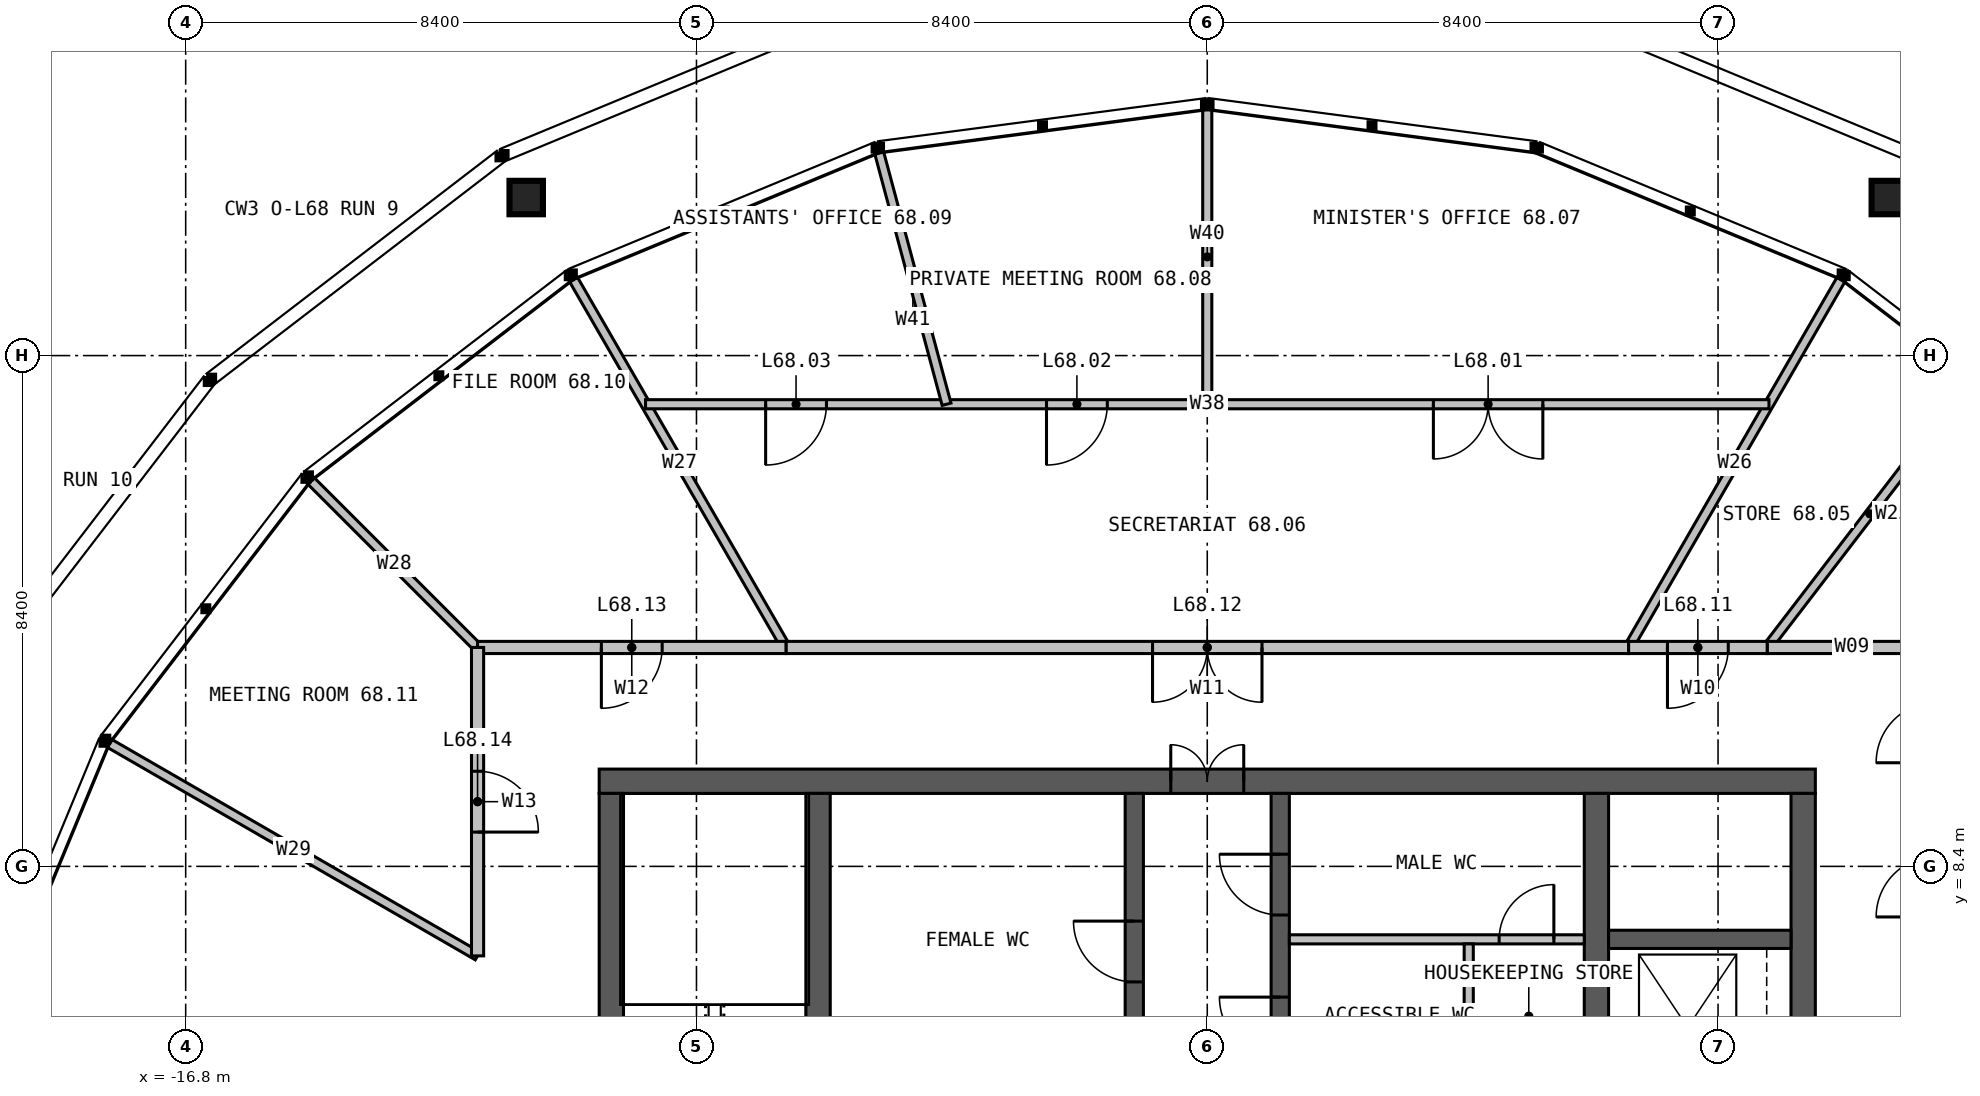
"""IFC4 building model, lengths in metres.
Left out: names, types, materials, properties, quantities, classifications, styles, units other than length and angle.
Written with IfcOpenShell. Run it as: python <this file> out.ifc"""

import sys

from ifc_helpers import new_model, si_unit, direction, frame, frame_2d, origin, origin_2d, place, context, subcontext, project, spatial, rectangle, hollow_rectangle, extrude, element, fill, save


model = new_model("IFC4")
c1 = context("Model", 3, precision=1e-05, world=origin(), true_north=direction((0.0, 1.0)))
c2 = subcontext(c1, "Body", "Model", "MODEL_VIEW")
j1 = project(units=[si_unit("LENGTHUNIT", "METRE"), si_unit("PLANEANGLEUNIT", "RADIAN")], contexts=[c1])
p1 = place(None, origin())
s1 = spatial("IfcSite", under=j1, at=p1, CompositionType="ELEMENT")
p2 = place(p1, origin())
s2 = spatial("IfcBuilding", under=s1, at=p2, CompositionType="ELEMENT")
p3 = place(p2, frame((0.0, 0.0, 280.0)))
s3 = spatial("IfcBuildingStorey", under=s2, at=p3, CompositionType="ELEMENT", Elevation=280.0)
p4 = place(p3, frame((-10.0, 9.8, 0.0), z_axis=(0.0, 0.0, 1.0), x_axis=(1.0, 0.0, 0.0)))
e1 = element("IfcWall", 1, at=p4, inside=s3, PredefinedType="SOLIDWALL", context=c2, shape_type="SweptSolid", body=[
    extrude(rectangle(XDim=20.0, YDim=0.4, at=frame_2d((10.0, 0.0))), origin(), (0.0, 0.0, 1.0), 4.0),
])
p5 = place(p4, frame((9.4, 0.0, 0.0)))
e2 = element("IfcOpeningElement", 2, at=p5, cuts=e1, PredefinedType="OPENING", context=c2, shape_type="SweptSolid", body=[
    extrude(rectangle(XDim=1.2, YDim=2.2, at=frame_2d((0.6, 1.1))), frame((0.0, 0.21, 0.0), z_axis=(0.0, -1.0, 0.0), x_axis=(1.0, 0.0, 0.0)), (0.0, 0.0, 1.0), 0.42),
])
for number, where, z_axis, x_axis in (
    (3, (9.8, -9.6, 0.0), (0.0, 0.0, 1.0), (0.0, 1.0, 0.0)),
    (4, (-9.8, 9.6, 0.0), (0.0, 0.0, 1.0), (0.0, -1.0, 0.0)),
):
    element("IfcWall", number, at=place(p3, frame(where, z_axis=z_axis, x_axis=x_axis)), inside=s3, PredefinedType="SOLIDWALL", context=c2, shape_type="SweptSolid", body=[
        extrude(rectangle(XDim=19.2, YDim=0.4, at=frame_2d((9.6, 0.0))), origin(), (0.0, 0.0, 1.0), 4.0),
    ])
p6 = place(p3, frame((-6.4, -9.6, 0.0), z_axis=(0.0, 0.0, 1.0), x_axis=(0.0, 1.0, 0.0)))
e5 = element("IfcWall", 5, at=p6, inside=s3, PredefinedType="SOLIDWALL", context=c2, shape_type="SweptSolid", body=[
    extrude(rectangle(XDim=19.2, YDim=0.4, at=frame_2d((9.6, 0.0))), origin(), (0.0, 0.0, 1.0), 4.0),
])
p7 = place(p6, frame((9.1, 0.0, 0.0)))
e6 = element("IfcOpeningElement", 6, at=p7, cuts=e5, PredefinedType="OPENING", context=c2, shape_type="SweptSolid", body=[
    extrude(rectangle(XDim=1.0, YDim=2.2, at=frame_2d((0.5, 1.1))), frame((0.0, 0.21, 0.0), z_axis=(0.0, -1.0, 0.0), x_axis=(1.0, 0.0, 0.0)), (0.0, 0.0, 1.0), 0.42),
])
p8 = place(p3, frame((6.4, 9.6, 0.0), z_axis=(0.0, 0.0, 1.0), x_axis=(0.0, -1.0, 0.0)))
e7 = element("IfcWall", 7, at=p8, inside=s3, PredefinedType="SOLIDWALL", context=c2, shape_type="SweptSolid", body=[
    extrude(rectangle(XDim=19.2, YDim=0.4, at=frame_2d((9.6, 0.0))), origin(), (0.0, 0.0, 1.0), 4.0),
])
p9 = place(p8, frame((9.1, 0.0, 0.0)))
e8 = element("IfcOpeningElement", 8, at=p9, cuts=e7, PredefinedType="OPENING", context=c2, shape_type="SweptSolid", body=[
    extrude(rectangle(XDim=1.0, YDim=2.2, at=frame_2d((0.5, 1.1))), frame((0.0, 0.21, 0.0), z_axis=(0.0, -1.0, 0.0), x_axis=(1.0, 0.0, 0.0)), (0.0, 0.0, 1.0), 0.42),
])
p10 = place(p3, frame((-1.2, 1.45, 0.0), z_axis=(0.0, 0.0, 1.0), x_axis=(0.0, 1.0, 0.0)))
e9 = element("IfcWall", 9, at=p10, inside=s3, PredefinedType="SOLIDWALL", context=c2, shape_type="SweptSolid", body=[
    extrude(rectangle(XDim=8.15, YDim=0.3, at=frame_2d((4.075, 0.0))), origin(), (0.0, 0.0, 1.0), 4.0),
])
p11 = place(p10, frame((5.05, 0.0, 0.0)))
e10 = element("IfcOpeningElement", 10, at=p11, cuts=e9, PredefinedType="OPENING", context=c2, shape_type="SweptSolid", body=[
    extrude(rectangle(XDim=1.0, YDim=2.2, at=frame_2d((0.5, 1.1))), frame((0.0, 0.16, 0.0), z_axis=(0.0, -1.0, 0.0), x_axis=(1.0, 0.0, 0.0)), (0.0, 0.0, 1.0), 0.32),
])
p12 = place(p3, frame((1.2, 1.45, 0.0), z_axis=(0.0, 0.0, 1.0), x_axis=(0.0, 1.0, 0.0)))
e11 = element("IfcWall", 11, at=p12, inside=s3, PredefinedType="SOLIDWALL", context=c2, shape_type="SweptSolid", body=[
    extrude(rectangle(XDim=8.15, YDim=0.3, at=frame_2d((4.075, 0.0))), origin(), (0.0, 0.0, 1.0), 4.0),
])
p13 = place(p12, frame((3.8, 0.0, 0.0)))
e12 = element("IfcOpeningElement", 12, at=p13, cuts=e11, PredefinedType="OPENING", context=c2, shape_type="SweptSolid", body=[
    extrude(rectangle(XDim=1.0, YDim=2.2, at=frame_2d((0.5, 1.1))), frame((0.0, 0.16, 0.0), z_axis=(0.0, -1.0, 0.0), x_axis=(1.0, 0.0, 0.0)), (0.0, 0.0, 1.0), 0.32),
])
p14 = place(p12, frame((6.15, 0.0, 0.0)))
e13 = element("IfcOpeningElement", 13, at=p14, cuts=e11, PredefinedType="OPENING", context=c2, shape_type="SweptSolid", body=[
    extrude(rectangle(XDim=1.0, YDim=2.2, at=frame_2d((0.5, 1.1))), frame((0.0, 0.16, 0.0), z_axis=(0.0, -1.0, 0.0), x_axis=(1.0, 0.0, 0.0)), (0.0, 0.0, 1.0), 0.32),
])
p15 = place(p3, frame((6.6, 7.2, 0.0), z_axis=(0.0, 0.0, 1.0), x_axis=(1.0, 0.0, 0.0)))
e14 = element("IfcWall", 14, at=p15, inside=s3, PredefinedType="SOLIDWALL", context=c2, shape_type="SweptSolid", body=[
    extrude(rectangle(XDim=3.0, YDim=0.3, at=frame_2d((1.5, 0.0))), origin(), (0.0, 0.0, 1.0), 4.0),
])
for number, where, z_axis, x_axis in (
    (15, (11.2, 19.399, -0.71), (0.0, 0.0, 1.0), (1.0, 0.0, 0.0)),
    (16, (-11.2, 19.399, -0.71), (0.0, 0.0, 1.0), (1.0, 0.0, 0.0)),
):
    element("IfcColumn", number, at=place(p3, frame(where, z_axis=z_axis, x_axis=x_axis)), inside=s3, PredefinedType="COLUMN", context=c2, shape_type="SweptSolid", body=[
        extrude(hollow_rectangle(XDim=0.55, YDim=0.55, WallThickness=0.04, at=origin_2d()), origin(), (0.0, 0.0, 1.0), 4.0),
    ])
p16 = place(p3, frame((1.35, 7.2, 0.0), z_axis=(0.0, 0.0, 1.0), x_axis=(1.0, 0.0, 0.0)))
e17 = element("IfcWall", 17, at=p16, inside=s3, PredefinedType="PARTITIONING", context=c2, shape_type="SweptSolid", body=[
    extrude(rectangle(XDim=4.85, YDim=0.15, at=frame_2d((2.425, 0.0))), origin(), (0.0, 0.0, 1.0), 3.75),
])
p17 = place(p16, frame((3.45, 0.0, 0.0)))
e18 = element("IfcOpeningElement", 18, at=p17, cuts=e17, PredefinedType="OPENING", context=c2, shape_type="SweptSolid", body=[
    extrude(rectangle(XDim=0.9, YDim=2.2, at=frame_2d((0.45, 1.1))), frame((0.0, 0.085, 0.0), z_axis=(0.0, -1.0, 0.0), x_axis=(1.0, 0.0, 0.0)), (0.0, 0.0, 1.0), 0.17),
])
p18 = place(p3, frame((4.3, 4.75, 0.0), z_axis=(0.0, 0.0, 1.0), x_axis=(0.0, 1.0, 0.0)))
e19 = element("IfcWall", 19, at=p18, inside=s3, PredefinedType="PARTITIONING", context=c2, shape_type="SweptSolid", body=[
    extrude(rectangle(XDim=2.375, YDim=0.15, at=frame_2d((1.188, 0.0))), origin(), (0.0, 0.0, 1.0), 3.75),
])
p19 = place(p3, frame((9.208, 12.0, 0.0), z_axis=(0.0, 0.0, 1.0), x_axis=(0.608745928377, 0.793365234103, 0.0)))
e20 = element("IfcWall", 20, at=p19, inside=s3, PredefinedType="PARTITIONING", context=c2, shape_type="SweptSolid", body=[
    extrude(rectangle(XDim=5.542, YDim=0.15, at=frame_2d((2.771, 0.0))), origin(), (0.0, 0.0, 1.0), 2.79),
])
for number, where, z_axis, x_axis in (
    (21, (6.928, 12.0, 0.0), (0.0, 0.0, 1.0), (0.5, 0.866, 0.0)),
    (22, (-6.928, 12.0, 0.0), (0.0, 0.0, 1.0), (-0.5, 0.866, 0.0)),
):
    element("IfcWall", number, at=place(p3, frame(where, z_axis=z_axis, x_axis=x_axis)), inside=s3, PredefinedType="PARTITIONING", context=c2, shape_type="SweptSolid", body=[
        extrude(rectangle(XDim=6.99, YDim=0.15, at=frame_2d((3.495, 0.0))), origin(), (0.0, 0.0, 1.0), 2.79),
    ])
p20 = place(p3, frame((-12.0, 12.0, 0.0), z_axis=(0.0, 0.0, 1.0), x_axis=(-0.707106781187, 0.707106781187, 0.0)))
e23 = element("IfcWall", 23, at=p20, inside=s3, PredefinedType="PARTITIONING", context=c2, shape_type="SweptSolid", body=[
    extrude(rectangle(XDim=3.876, YDim=0.15, at=frame_2d((1.938, 0.0))), origin(), (0.0, 0.0, 1.0), 2.7),
])
p21 = place(p3, frame((-12.0, 6.928, 0.0), z_axis=(0.0, 0.0, 1.0), x_axis=(-0.866031452229, 0.49998952364, 0.0)))
e24 = element("IfcWall", 24, at=p21, inside=s3, PredefinedType="PARTITIONING", context=c2, shape_type="SweptSolid", body=[
    extrude(rectangle(XDim=6.99, YDim=0.15, at=frame_2d((3.495, 0.0))), origin(), (0.0, 0.0, 1.0), 2.7),
])
p22 = place(p3, frame((12.0, 12.0, 0.0), z_axis=(0.0, 0.0, 1.0), x_axis=(-1.0, 0.0, 0.0)))
e25 = element("IfcWall", 25, at=p22, inside=s3, PredefinedType="PARTITIONING", context=c2, shape_type="SweptSolid", body=[
    extrude(rectangle(XDim=2.792, YDim=0.2, at=frame_2d((1.396, 0.0))), origin(), (0.0, 0.0, 1.0), 3.7),
])
p23 = place(p3, frame((9.208, 12.0, 0.0), z_axis=(0.0, 0.0, 1.0), x_axis=(-1.0, 0.0, 0.0)))
e26 = element("IfcWall", 26, at=p23, inside=s3, PredefinedType="PARTITIONING", context=c2, shape_type="SweptSolid", body=[
    extrude(rectangle(XDim=2.28, YDim=0.2, at=frame_2d((1.14, 0.0))), origin(), (0.0, 0.0, 1.0), 3.7),
])
p24 = place(p23, frame((0.64, 0.0, 0.0)))
e27 = element("IfcOpeningElement", 27, at=p24, cuts=e26, PredefinedType="OPENING", context=c2, shape_type="SweptSolid", body=[
    extrude(rectangle(XDim=1.0, YDim=2.2, at=frame_2d((0.5, 1.1))), frame((0.0, 0.11, 0.0), z_axis=(0.0, -1.0, 0.0), x_axis=(1.0, 0.0, 0.0)), (0.0, 0.0, 1.0), 0.22),
])
p25 = place(p3, frame((9.238, 16.0, 0.0), z_axis=(0.0, 0.0, 1.0), x_axis=(-1.0, 0.0, 0.0)))
e28 = element("IfcWall", 28, at=p25, inside=s3, PredefinedType="PARTITIONING", context=c2, shape_type="SweptSolid", body=[
    extrude(rectangle(XDim=18.475, YDim=0.15, at=frame_2d((9.238, 0.0))), origin(), (0.0, 0.0, 1.0), 2.79),
])
p26 = place(p25, frame((3.719, 0.0, 0.0)))
e29 = element("IfcOpeningElement", 29, at=p26, cuts=e28, PredefinedType="OPENING", context=c2, shape_type="SweptSolid", body=[
    extrude(rectangle(XDim=1.8, YDim=2.2, at=frame_2d((0.9, 1.1))), frame((0.0, 0.085, 0.0), z_axis=(0.0, -1.0, 0.0), x_axis=(1.0, 0.0, 0.0)), (0.0, 0.0, 1.0), 0.17),
])
p27 = place(p25, frame((10.881, 0.0, 0.0)))
e30 = element("IfcOpeningElement", 30, at=p27, cuts=e28, PredefinedType="OPENING", context=c2, shape_type="SweptSolid", body=[
    extrude(rectangle(XDim=1.0, YDim=2.2, at=frame_2d((0.5, 1.1))), frame((0.0, 0.085, 0.0), z_axis=(0.0, -1.0, 0.0), x_axis=(1.0, 0.0, 0.0)), (0.0, 0.0, 1.0), 0.17),
])
p28 = place(p25, frame((15.5, 0.0, 0.0)))
e31 = element("IfcOpeningElement", 31, at=p28, cuts=e28, PredefinedType="OPENING", context=c2, shape_type="SweptSolid", body=[
    extrude(rectangle(XDim=1.0, YDim=2.2, at=frame_2d((0.5, 1.1))), frame((0.0, 0.085, 0.0), z_axis=(0.0, -1.0, 0.0), x_axis=(1.0, 0.0, 0.0)), (0.0, 0.0, 1.0), 0.17),
])
p29 = place(p3, frame((0.0, 16.0, 0.0), z_axis=(0.0, 0.0, 1.0), x_axis=(0.0, 1.0, 0.0)))
e32 = element("IfcWall", 32, at=p29, inside=s3, PredefinedType="PARTITIONING", context=c2, shape_type="SweptSolid", body=[
    extrude(rectangle(XDim=4.846, YDim=0.15, at=frame_2d((2.423, 0.0))), origin(), (0.0, 0.0, 1.0), 2.79),
])
p30 = place(p3, frame((-4.287, 16.0, 0.0), z_axis=(0.0, 0.0, 1.0), x_axis=(-0.258854832266, 0.965916236437, 0.0)))
e33 = element("IfcWall", 33, at=p30, inside=s3, PredefinedType="PARTITIONING", context=c2, shape_type="SweptSolid", body=[
    extrude(rectangle(XDim=4.282, YDim=0.15, at=frame_2d((2.141, 0.0))), origin(), (0.0, 0.0, 1.0), 2.7),
])
p31 = place(p3, frame((6.928, 12.0, 0.0), z_axis=(0.0, 0.0, 1.0), x_axis=(-1.0, 0.0, 0.0)))
e34 = element("IfcWall", 34, at=p31, inside=s3, PredefinedType="PARTITIONING", context=c2, shape_type="SweptSolid", body=[
    extrude(rectangle(XDim=13.856, YDim=0.2, at=frame_2d((6.928, 0.0))), origin(), (0.0, 0.0, 1.0), 3.7),
])
p32 = place(p31, frame((6.028, 0.0, 0.0)))
e35 = element("IfcOpeningElement", 35, at=p32, cuts=e34, PredefinedType="OPENING", context=c2, shape_type="SweptSolid", body=[
    extrude(rectangle(XDim=1.8, YDim=2.2, at=frame_2d((0.9, 1.1))), frame((0.0, 0.11, 0.0), z_axis=(0.0, -1.0, 0.0), x_axis=(1.0, 0.0, 0.0)), (0.0, 0.0, 1.0), 0.22),
])
p33 = place(p3, frame((-6.928, 12.0, 0.0), z_axis=(0.0, 0.0, 1.0), x_axis=(-1.0, 0.0, 0.0)))
e36 = element("IfcWall", 36, at=p33, inside=s3, PredefinedType="PARTITIONING", context=c2, shape_type="SweptSolid", body=[
    extrude(rectangle(XDim=5.072, YDim=0.2, at=frame_2d((2.536, 0.0))), origin(), (0.0, 0.0, 1.0), 3.7),
])
p34 = place(p33, frame((2.036, 0.0, 0.0)))
e37 = element("IfcOpeningElement", 37, at=p34, cuts=e36, PredefinedType="OPENING", context=c2, shape_type="SweptSolid", body=[
    extrude(rectangle(XDim=1.0, YDim=2.2, at=frame_2d((0.5, 1.1))), frame((0.0, 0.11, 0.0), z_axis=(0.0, -1.0, 0.0), x_axis=(1.0, 0.0, 0.0)), (0.0, 0.0, 1.0), 0.22),
])
p35 = place(p3, frame((-12.0, 12.0, 0.0), z_axis=(0.0, 0.0, 1.0), x_axis=(0.0, -1.0, 0.0)))
e38 = element("IfcWall", 38, at=p35, inside=s3, PredefinedType="PARTITIONING", context=c2, shape_type="SweptSolid", body=[
    extrude(rectangle(XDim=5.072, YDim=0.2, at=frame_2d((2.536, 0.0))), origin(), (0.0, 0.0, 1.0), 3.7),
])
p36 = place(p35, frame((2.036, 0.0, 0.0)))
e39 = element("IfcOpeningElement", 39, at=p36, cuts=e38, PredefinedType="OPENING", context=c2, shape_type="SweptSolid", body=[
    extrude(rectangle(XDim=1.0, YDim=2.2, at=frame_2d((0.5, 1.1))), frame((0.0, 0.11, 0.0), z_axis=(0.0, -1.0, 0.0), x_axis=(1.0, 0.0, 0.0)), (0.0, 0.0, 1.0), 0.22),
])
p37 = place(p5, origin())
e40 = element("IfcDoor", 40, at=p37, inside=s3, OperationType="DOUBLE_DOOR_SINGLE_SWING", PredefinedType="DOOR", context=c2, shape_type="SweptSolid", body=[
    extrude(rectangle(XDim=1.2, YDim=2.2, at=frame_2d((0.6, 1.1))), frame((0.0, 0.025, 0.0), z_axis=(0.0, -1.0, 0.0), x_axis=(1.0, 0.0, 0.0)), (0.0, 0.0, 1.0), 0.05),
])
fill(e2, e40)
p38 = place(p11, origin())
e41 = element("IfcDoor", 41, at=p38, inside=s3, OperationType="SINGLE_SWING_RIGHT", PredefinedType="DOOR", context=c2, shape_type="SweptSolid", body=[
    extrude(rectangle(XDim=1.0, YDim=2.2, at=frame_2d((0.5, 1.1))), frame((0.0, 0.025, 0.0), z_axis=(0.0, -1.0, 0.0), x_axis=(1.0, 0.0, 0.0)), (0.0, 0.0, 1.0), 0.05),
])
fill(e10, e41)
p39 = place(p13, origin())
e42 = element("IfcDoor", 42, at=p39, inside=s3, OperationType="SINGLE_SWING_RIGHT", PredefinedType="DOOR", context=c2, shape_type="SweptSolid", body=[
    extrude(rectangle(XDim=1.0, YDim=2.2, at=frame_2d((0.5, 1.1))), frame((0.0, 0.025, 0.0), z_axis=(0.0, -1.0, 0.0), x_axis=(1.0, 0.0, 0.0)), (0.0, 0.0, 1.0), 0.05),
])
fill(e12, e42)
p40 = place(p14, origin())
e43 = element("IfcDoor", 43, at=p40, inside=s3, OperationType="SINGLE_SWING_RIGHT", PredefinedType="DOOR", context=c2, shape_type="SweptSolid", body=[
    extrude(rectangle(XDim=1.0, YDim=2.2, at=frame_2d((0.5, 1.1))), frame((0.0, 0.025, 0.0), z_axis=(0.0, -1.0, 0.0), x_axis=(1.0, 0.0, 0.0)), (0.0, 0.0, 1.0), 0.05),
])
fill(e13, e43)
p41 = place(p17, origin())
e44 = element("IfcDoor", 44, at=p41, inside=s3, OperationType="SINGLE_SWING_RIGHT", PredefinedType="DOOR", context=c2, shape_type="SweptSolid", body=[
    extrude(rectangle(XDim=0.9, YDim=2.2, at=frame_2d((0.45, 1.1))), frame((0.0, 0.025, 0.0), z_axis=(0.0, -1.0, 0.0), x_axis=(1.0, 0.0, 0.0)), (0.0, 0.0, 1.0), 0.05),
])
fill(e18, e44)
p42 = place(p24, origin())
e45 = element("IfcDoor", 45, at=p42, inside=s3, OperationType="SINGLE_SWING_RIGHT", PredefinedType="DOOR", context=c2, shape_type="SweptSolid", body=[
    extrude(rectangle(XDim=1.0, YDim=2.2, at=frame_2d((0.5, 1.1))), frame((0.0, 0.025, 0.0), z_axis=(0.0, -1.0, 0.0), x_axis=(1.0, 0.0, 0.0)), (0.0, 0.0, 1.0), 0.05),
])
fill(e27, e45)
p43 = place(p26, origin())
e46 = element("IfcDoor", 46, at=p43, inside=s3, OperationType="DOUBLE_DOOR_SINGLE_SWING", PredefinedType="DOOR", context=c2, shape_type="SweptSolid", body=[
    extrude(rectangle(XDim=1.8, YDim=2.2, at=frame_2d((0.9, 1.1))), frame((0.0, 0.025, 0.0), z_axis=(0.0, -1.0, 0.0), x_axis=(1.0, 0.0, 0.0)), (0.0, 0.0, 1.0), 0.05),
])
fill(e29, e46)
p44 = place(p27, origin())
e47 = element("IfcDoor", 47, at=p44, inside=s3, OperationType="SINGLE_SWING_RIGHT", PredefinedType="DOOR", context=c2, shape_type="SweptSolid", body=[
    extrude(rectangle(XDim=1.0, YDim=2.2, at=frame_2d((0.5, 1.1))), frame((0.0, 0.025, 0.0), z_axis=(0.0, -1.0, 0.0), x_axis=(1.0, 0.0, 0.0)), (0.0, 0.0, 1.0), 0.05),
])
fill(e30, e47)
p45 = place(p28, origin())
e48 = element("IfcDoor", 48, at=p45, inside=s3, OperationType="SINGLE_SWING_RIGHT", PredefinedType="DOOR", context=c2, shape_type="SweptSolid", body=[
    extrude(rectangle(XDim=1.0, YDim=2.2, at=frame_2d((0.5, 1.1))), frame((0.0, 0.025, 0.0), z_axis=(0.0, -1.0, 0.0), x_axis=(1.0, 0.0, 0.0)), (0.0, 0.0, 1.0), 0.05),
])
fill(e31, e48)
p46 = place(p32, origin())
e49 = element("IfcDoor", 49, at=p46, inside=s3, OperationType="DOUBLE_DOOR_SINGLE_SWING", PredefinedType="DOOR", context=c2, shape_type="SweptSolid", body=[
    extrude(rectangle(XDim=1.8, YDim=2.2, at=frame_2d((0.9, 1.1))), frame((0.0, 0.025, 0.0), z_axis=(0.0, -1.0, 0.0), x_axis=(1.0, 0.0, 0.0)), (0.0, 0.0, 1.0), 0.05),
])
fill(e35, e49)
p47 = place(p34, origin())
e50 = element("IfcDoor", 50, at=p47, inside=s3, OperationType="SINGLE_SWING_RIGHT", PredefinedType="DOOR", context=c2, shape_type="SweptSolid", body=[
    extrude(rectangle(XDim=1.0, YDim=2.2, at=frame_2d((0.5, 1.1))), frame((0.0, 0.025, 0.0), z_axis=(0.0, -1.0, 0.0), x_axis=(1.0, 0.0, 0.0)), (0.0, 0.0, 1.0), 0.05),
])
fill(e37, e50)
p48 = place(p36, origin())
e51 = element("IfcDoor", 51, at=p48, inside=s3, OperationType="SINGLE_SWING_RIGHT", PredefinedType="DOOR", context=c2, shape_type="SweptSolid", body=[
    extrude(rectangle(XDim=1.0, YDim=2.2, at=frame_2d((0.5, 1.1))), frame((0.0, 0.025, 0.0), z_axis=(0.0, -1.0, 0.0), x_axis=(1.0, 0.0, 0.0)), (0.0, 0.0, 1.0), 0.05),
])
fill(e39, e51)
save(model, sys.argv[1])
